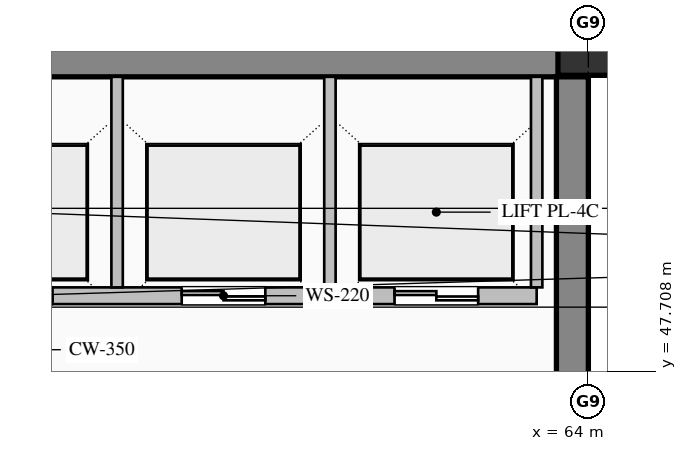
"""IFC4 building model, lengths in metres.
Left out: names, types, materials, properties, quantities, classifications, styles, units other than length and angle.
Written with IfcOpenShell. Run it as: python <this file> out.ifc"""

import sys

from ifc_helpers import new_model, si_unit, direction, frame, frame_2d, origin, origin_2d, place, context, subcontext, project, spatial, rectangle, hollow_rectangle, extrude, element, fill, save


model = new_model("IFC4")
c1 = context("Model", 3, precision=1e-05, world=origin(), true_north=direction((0.0, 1.0)))
c2 = subcontext(c1, "Body", "Model", "MODEL_VIEW")
j1 = project(units=[si_unit("LENGTHUNIT", "METRE"), si_unit("PLANEANGLEUNIT", "RADIAN")], contexts=[c1])
p1 = place(None, origin())
s1 = spatial("IfcSite", under=j1, at=p1, CompositionType="ELEMENT")
p2 = place(p1, origin())
s2 = spatial("IfcBuilding", under=s1, at=p2, CompositionType="ELEMENT")
p3 = place(p2, frame((0.0, 0.0, 339.2)))
s3 = spatial("IfcBuildingStorey", under=s2, at=p3, CompositionType="ELEMENT", Elevation=339.2)
p4 = place(p3, frame((40.5, 51.79, 0.0), z_axis=(0.0, 0.0, 1.0), x_axis=(1.0, 0.0, 0.0)))
e1 = element("IfcWall", 1, at=p4, inside=s3, PredefinedType="SHEAR", context=c2, shape_type="SweptSolid", body=[
    extrude(rectangle(XDim=23.5, YDim=0.42, at=frame_2d((11.75, 0.0))), origin(), (0.0, 0.0, 1.0), 3.785),
])
p5 = place(p3, frame((63.79, 36.32, 0.0), z_axis=(0.0, 0.0, 1.0), x_axis=(0.0, 1.0, 0.0)))
e2 = element("IfcWall", 2, at=p5, inside=s3, PredefinedType="SHEAR", context=c2, shape_type="SweptSolid", body=[
    extrude(rectangle(XDim=15.26, YDim=0.42, at=frame_2d((7.63, 0.0))), origin(), (0.0, 0.0, 1.0), 3.785),
])
p6 = place(p3, frame((64.0, 52.0, 0.0), z_axis=(0.0, 0.0, 1.0), x_axis=(1.0, 0.0, 0.0)))
e3 = element("IfcColumn", 3, at=p6, inside=s3, PredefinedType="COLUMN", context=c2, shape_type="SweptSolid", body=[
    extrude(hollow_rectangle(XDim=0.8, YDim=0.8, WallThickness=0.032, at=origin_2d()), origin(), (0.0, 0.0, 1.0), 4.0),
])
p7 = place(p3, frame((63.32, 48.7, 0.0), z_axis=(0.0, 0.0, 1.0), x_axis=(-1.0, 0.0, 0.0)))
e4 = element("IfcWall", 4, at=p7, inside=s3, PredefinedType="PARTITIONING", context=c2, shape_type="SweptSolid", body=[
    extrude(rectangle(XDim=8.24, YDim=0.22, at=frame_2d((4.12, 0.0))), origin(), (0.0, 0.0, 1.0), 3.785),
])
p8 = place(p7, frame((6.37, 0.0, 0.0)))
e5 = element("IfcOpeningElement", 5, at=p8, cuts=e4, PredefinedType="OPENING", context=c2, shape_type="SweptSolid", body=[
    extrude(rectangle(XDim=1.1, YDim=2.2, at=frame_2d((0.55, 1.1))), frame((0.0, 0.12, 0.0), z_axis=(0.0, -1.0, 0.0), x_axis=(1.0, 0.0, 0.0)), (0.0, 0.0, 1.0), 0.24),
])
p9 = place(p7, frame((3.57, 0.0, 0.0)))
e6 = element("IfcOpeningElement", 6, at=p9, cuts=e4, PredefinedType="OPENING", context=c2, shape_type="SweptSolid", body=[
    extrude(rectangle(XDim=1.1, YDim=2.2, at=frame_2d((0.55, 1.1))), frame((0.0, 0.12, 0.0), z_axis=(0.0, -1.0, 0.0), x_axis=(1.0, 0.0, 0.0)), (0.0, 0.0, 1.0), 0.24),
])
p10 = place(p7, frame((0.77, 0.0, 0.0)))
e7 = element("IfcOpeningElement", 7, at=p10, cuts=e4, PredefinedType="OPENING", context=c2, shape_type="SweptSolid", body=[
    extrude(rectangle(XDim=1.1, YDim=2.2, at=frame_2d((0.55, 1.1))), frame((0.0, 0.12, 0.0), z_axis=(0.0, -1.0, 0.0), x_axis=(1.0, 0.0, 0.0)), (0.0, 0.0, 1.0), 0.24),
])
for number, where, z_axis, x_axis in (
    (8, (57.8, 48.81, 0.0), (0.0, 0.0, 1.0), (0.0, 1.0, 0.0)),
    (9, (60.6, 48.81, 0.0), (0.0, 0.0, 1.0), (0.0, 1.0, 0.0)),
    (10, (63.32, 48.81, 0.0), (0.0, 0.0, 1.0), (0.0, 1.0, 0.0)),
):
    element("IfcWall", number, at=place(p3, frame(where, z_axis=z_axis, x_axis=x_axis)), inside=s3, PredefinedType="PARTITIONING", context=c2, shape_type="SweptSolid", body=[
        extrude(rectangle(XDim=2.77, YDim=0.15, at=frame_2d((1.385, 0.0))), origin(), (0.0, 0.0, 1.0), 3.785),
    ])
p11 = place(p9, origin())
e11 = element("IfcDoor", 11, at=p11, inside=s3, OperationType="DOUBLE_DOOR_SLIDING", PredefinedType="DOOR", context=c2, shape_type="SweptSolid", body=[
    extrude(rectangle(XDim=1.1, YDim=2.2, at=frame_2d((0.55, 1.1))), frame((0.0, 0.025, 0.0), z_axis=(0.0, -1.0, 0.0), x_axis=(1.0, 0.0, 0.0)), (0.0, 0.0, 1.0), 0.05),
])
fill(e6, e11)
p12 = place(p10, origin())
e12 = element("IfcDoor", 12, at=p12, inside=s3, OperationType="DOUBLE_DOOR_SLIDING", PredefinedType="DOOR", context=c2, shape_type="SweptSolid", body=[
    extrude(rectangle(XDim=1.1, YDim=2.2, at=frame_2d((0.55, 1.1))), frame((0.0, 0.025, 0.0), z_axis=(0.0, -1.0, 0.0), x_axis=(1.0, 0.0, 0.0)), (0.0, 0.0, 1.0), 0.05),
])
fill(e7, e12)
save(model, sys.argv[1])
